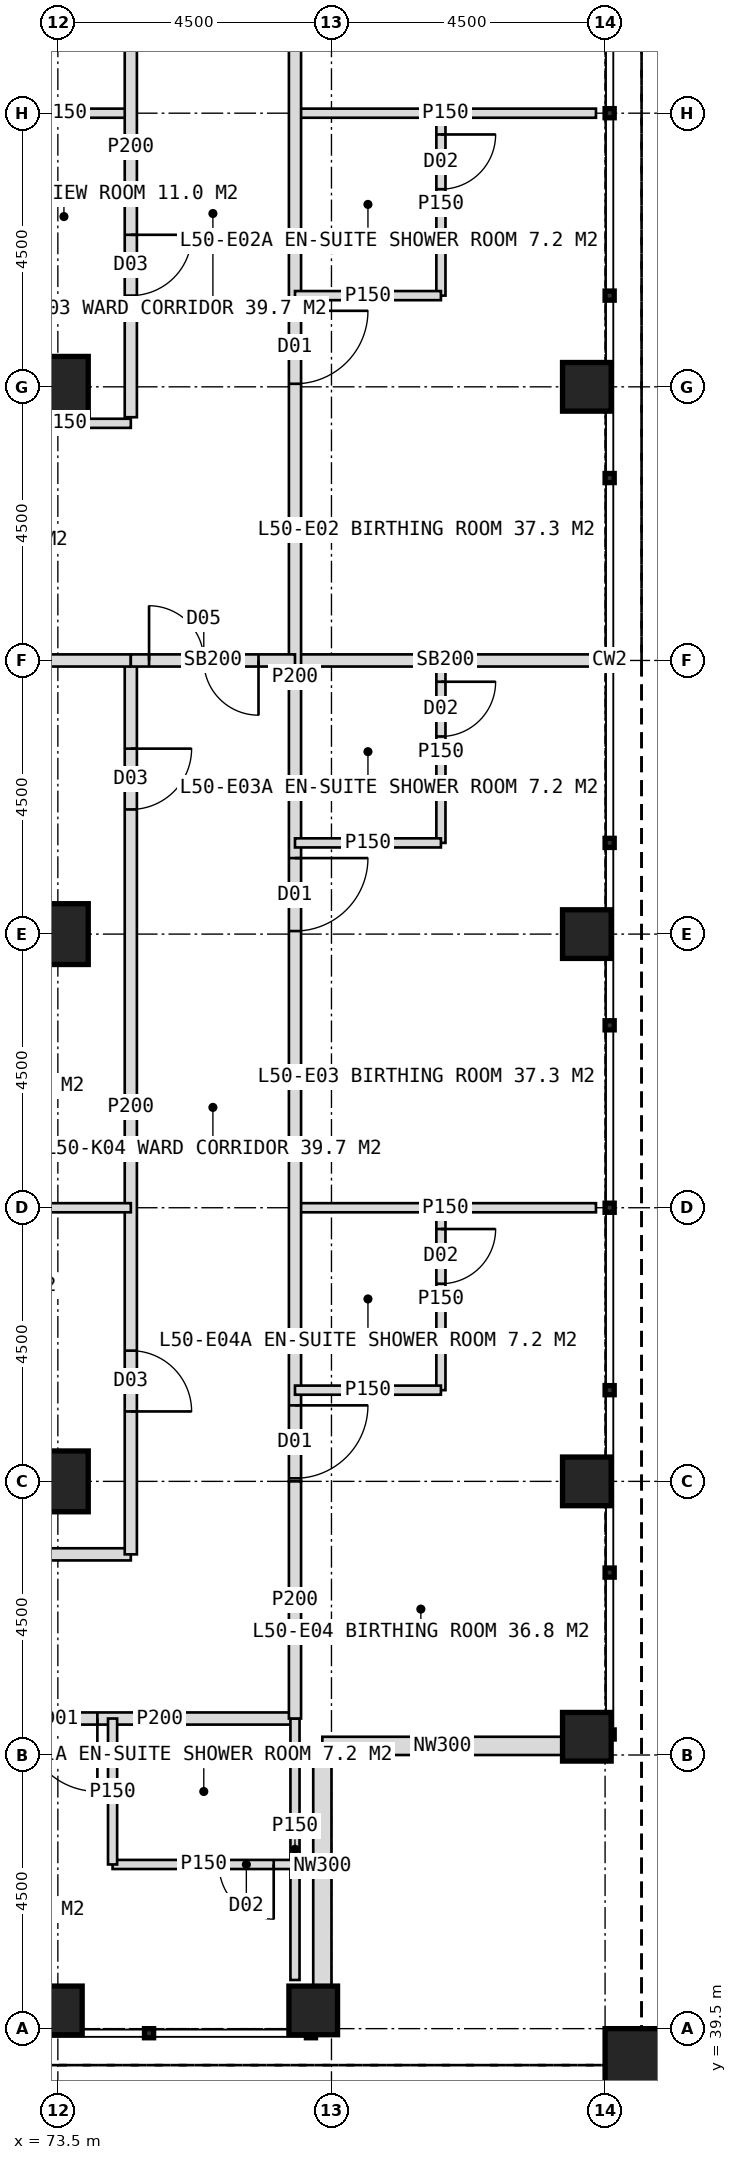
"""IFC4 building model, lengths in metres.
Left out: names, types, materials, properties, quantities, classifications, styles, units other than length and angle.
Written with IfcOpenShell. Run it as: python <this file> out.ifc"""

import sys

from ifc_helpers import new_model, si_unit, direction, frame, frame_2d, origin, origin_2d, place, context, subcontext, project, spatial, rectangle, hollow_rectangle, extrude, element, fill, save


model = new_model("IFC4")
c1 = context("Model", 3, precision=1e-05, world=origin(), true_north=direction((0.0, 1.0)))
c2 = subcontext(c1, "Body", "Model", "MODEL_VIEW")
j1 = project(units=[si_unit("LENGTHUNIT", "METRE"), si_unit("PLANEANGLEUNIT", "RADIAN")], contexts=[c1])
p1 = place(None, origin())
s1 = spatial("IfcSite", under=j1, at=p1, CompositionType="ELEMENT")
p2 = place(p1, origin())
s2 = spatial("IfcBuilding", under=s1, at=p2, CompositionType="ELEMENT")
p3 = place(p2, frame((0.0, 0.0, 209.0)))
s3 = spatial("IfcBuildingStorey", under=s2, at=p3, CompositionType="ELEMENT", Elevation=209.0)
for number, where, z_axis, x_axis in (
    (1, (73.5, 48.5, 0.0), (0.0, 0.0, 1.0), (1.0, 0.0, 0.0)),
    (2, (73.5, 57.5, 0.0), (0.0, 0.0, 1.0), (1.0, 0.0, 0.0)),
    (3, (73.5, 66.5, 0.0), (0.0, 0.0, 1.0), (1.0, 0.0, 0.0)),
):
    element("IfcColumn", number, at=place(p3, frame(where, z_axis=z_axis, x_axis=x_axis)), inside=s3, PredefinedType="COLUMN", context=c2, shape_type="SweptSolid", body=[
        extrude(hollow_rectangle(XDim=1.0, YDim=1.0, WallThickness=0.1, at=origin_2d()), origin(), (0.0, 0.0, 1.0), 4.0),
    ])
for number, where, z_axis, x_axis in (
    (4, (82.2, 44.3, 0.0), (0.0, 0.0, 1.0), (1.0, 0.0, 0.0)),
    (5, (82.2, 48.5, 0.0), (0.0, 0.0, 1.0), (1.0, 0.0, 0.0)),
    (6, (82.2, 57.5, 0.0), (0.0, 0.0, 1.0), (1.0, 0.0, 0.0)),
    (7, (82.2, 66.5, 0.0), (0.0, 0.0, 1.0), (1.0, 0.0, 0.0)),
    (8, (73.5, 39.8, 0.0), (0.0, 0.0, 1.0), (1.0, 0.0, 0.0)),
    (9, (77.7, 39.8, 0.0), (0.0, 0.0, 1.0), (1.0, 0.0, 0.0)),
):
    element("IfcColumn", number, at=place(p3, frame(where, z_axis=z_axis, x_axis=x_axis)), inside=s3, PredefinedType="COLUMN", context=c2, shape_type="SweptSolid", body=[
        extrude(hollow_rectangle(XDim=0.8, YDim=0.8, WallThickness=0.08, at=origin_2d()), origin(), (0.0, 0.0, 1.0), 4.0),
    ])
p4 = place(p3, frame((83.1, 38.9, 0.0), z_axis=(0.0, 0.0, 1.0), x_axis=(1.0, 0.0, 0.0)))
e10 = element("IfcColumn", 10, at=p4, inside=s3, PredefinedType="COLUMN", context=c2, shape_type="SweptSolid", body=[
    extrude(hollow_rectangle(XDim=1.2, YDim=1.2, WallThickness=0.07, at=origin_2d()), origin(), (0.0, 0.0, 1.0), 4.0),
])
for number, where, z_axis, x_axis in (
    (11, (81.8, 44.15, 0.0), (0.0, 0.0, 1.0), (-1.0, 0.0, 0.0)),
    (12, (77.85, 44.15, 0.0), (0.0, 0.0, 1.0), (0.0, -1.0, 0.0)),
):
    element("IfcWall", number, at=place(p3, frame(where, z_axis=z_axis, x_axis=x_axis)), inside=s3, PredefinedType="ELEMENTEDWALL", context=c2, shape_type="SweptSolid", body=[
        extrude(rectangle(XDim=3.95, YDim=0.3, at=frame_2d((1.975, 0.0))), origin(), (0.0, 0.0, 1.0), 2.85),
    ])
p5 = place(p3, frame((77.4, 44.6, 0.0), z_axis=(0.0, 0.0, 1.0), x_axis=(-1.0, 0.0, 0.0)))
e13 = element("IfcWall", 13, at=p5, inside=s3, PredefinedType="PARTITIONING", context=c2, shape_type="SweptSolid", body=[
    extrude(rectangle(XDim=4.45, YDim=0.2, at=frame_2d((2.225, 0.0))), origin(), (0.0, 0.0, 1.0), 2.85),
])
p6 = place(p5, frame((3.25, 0.0, 0.0)))
e14 = element("IfcOpeningElement", 14, at=p6, cuts=e13, PredefinedType="OPENING", context=c2, shape_type="SweptSolid", body=[
    extrude(rectangle(XDim=1.2, YDim=2.2, at=frame_2d((0.6, 1.1))), frame((0.0, 0.11, 0.0), z_axis=(0.0, -1.0, 0.0), x_axis=(1.0, 0.0, 0.0)), (0.0, 0.0, 1.0), 0.22),
])
p7 = place(p3, frame((77.4, 44.6, 0.0), z_axis=(0.0, 0.0, 1.0), x_axis=(0.0, -1.0, 0.0)))
e15 = element("IfcWall", 15, at=p7, inside=s3, PredefinedType="PARTITIONING", context=c2, shape_type="SweptSolid", body=[
    extrude(rectangle(XDim=4.3, YDim=0.15, at=frame_2d((2.15, 0.0))), origin(), (0.0, 0.0, 1.0), 2.85),
])
p8 = place(p3, frame((77.4, 42.2, 0.0), z_axis=(0.0, 0.0, 1.0), x_axis=(-1.0, 0.0, 0.0)))
e16 = element("IfcWall", 16, at=p8, inside=s3, PredefinedType="PARTITIONING", context=c2, shape_type="SweptSolid", body=[
    extrude(rectangle(XDim=3.0, YDim=0.15, at=frame_2d((1.5, 0.0))), origin(), (0.0, 0.0, 1.0), 3.75),
])
p9 = place(p8, frame((0.35, 0.0, 0.0)))
e17 = element("IfcOpeningElement", 17, at=p9, cuts=e16, PredefinedType="OPENING", context=c2, shape_type="SweptSolid", body=[
    extrude(rectangle(XDim=0.9, YDim=2.1, at=frame_2d((0.45, 1.05))), frame((0.0, 0.085, 0.0), z_axis=(0.0, -1.0, 0.0), x_axis=(1.0, 0.0, 0.0)), (0.0, 0.0, 1.0), 0.17),
])
p10 = place(p3, frame((74.4, 44.6, 0.0), z_axis=(0.0, 0.0, 1.0), x_axis=(0.0, -1.0, 0.0)))
e18 = element("IfcWall", 18, at=p10, inside=s3, PredefinedType="PARTITIONING", context=c2, shape_type="SweptSolid", body=[
    extrude(rectangle(XDim=2.4, YDim=0.15, at=frame_2d((1.2, 0.0))), origin(), (0.0, 0.0, 1.0), 3.75),
])
p11 = place(p3, frame((74.7, 47.3, 0.0), z_axis=(0.0, 0.0, 1.0), x_axis=(-1.0, 0.0, 0.0)))
e19 = element("IfcWall", 19, at=p11, inside=s3, PredefinedType="PARTITIONING", context=c2, shape_type="SweptSolid", body=[
    extrude(rectangle(XDim=5.7, YDim=0.2, at=frame_2d((2.85, 0.0))), origin(), (0.0, 0.0, 1.0), 3.75),
])
p12 = place(p3, frame((77.4, 71.0, 0.0), z_axis=(0.0, 0.0, 1.0), x_axis=(1.0, 0.0, 0.0)))
e20 = element("IfcWall", 20, at=p12, inside=s3, PredefinedType="PARTITIONING", context=c2, shape_type="SweptSolid", body=[
    extrude(rectangle(XDim=4.95, YDim=0.15, at=frame_2d((2.475, 0.0))), origin(), (0.0, 0.0, 1.0), 3.75),
])
p13 = place(p3, frame((77.4, 62.0, 0.0), z_axis=(0.0, 0.0, 1.0), x_axis=(1.0, 0.0, 0.0)))
e21 = element("IfcWall", 21, at=p13, inside=s3, PredefinedType="SOLIDWALL", context=c2, shape_type="SweptSolid", body=[
    extrude(rectangle(XDim=4.95, YDim=0.2, at=frame_2d((2.475, 0.0))), origin(), (0.0, 0.0, 1.0), 2.95),
])
p14 = place(p3, frame((77.4, 53.0, 0.0), z_axis=(0.0, 0.0, 1.0), x_axis=(1.0, 0.0, 0.0)))
e22 = element("IfcWall", 22, at=p14, inside=s3, PredefinedType="PARTITIONING", context=c2, shape_type="SweptSolid", body=[
    extrude(rectangle(XDim=4.95, YDim=0.15, at=frame_2d((2.475, 0.0))), origin(), (0.0, 0.0, 1.0), 3.75),
])
p15 = place(p3, frame((77.4, 74.95, 0.0), z_axis=(0.0, 0.0, 1.0), x_axis=(0.0, -1.0, 0.0)))
e23 = element("IfcWall", 23, at=p15, inside=s3, PredefinedType="PARTITIONING", context=c2, shape_type="SweptSolid", body=[
    extrude(rectangle(XDim=26.45, YDim=0.2, at=frame_2d((13.225, 0.0))), origin(), (0.0, 0.0, 1.0), 3.75),
])
p16 = place(p15, frame((7.2, 0.0, 0.0)))
e24 = element("IfcOpeningElement", 24, at=p16, cuts=e23, PredefinedType="OPENING", context=c2, shape_type="SweptSolid", body=[
    extrude(rectangle(XDim=1.2, YDim=2.2, at=frame_2d((0.6, 1.1))), frame((0.0, 0.11, 0.0), z_axis=(0.0, -1.0, 0.0), x_axis=(1.0, 0.0, 0.0)), (0.0, 0.0, 1.0), 0.22),
])
p17 = place(p15, frame((16.2, 0.0, 0.0)))
e25 = element("IfcOpeningElement", 25, at=p17, cuts=e23, PredefinedType="OPENING", context=c2, shape_type="SweptSolid", body=[
    extrude(rectangle(XDim=1.2, YDim=2.2, at=frame_2d((0.6, 1.1))), frame((0.0, 0.11, 0.0), z_axis=(0.0, -1.0, 0.0), x_axis=(1.0, 0.0, 0.0)), (0.0, 0.0, 1.0), 0.22),
])
p18 = place(p15, frame((25.2, 0.0, 0.0)))
e26 = element("IfcOpeningElement", 26, at=p18, cuts=e23, PredefinedType="OPENING", context=c2, shape_type="SweptSolid", body=[
    extrude(rectangle(XDim=1.2, YDim=2.2, at=frame_2d((0.6, 1.1))), frame((0.0, 0.11, 0.0), z_axis=(0.0, -1.0, 0.0), x_axis=(1.0, 0.0, 0.0)), (0.0, 0.0, 1.0), 0.22),
])
p19 = place(p3, frame((77.4, 48.5, 0.0), z_axis=(0.0, 0.0, 1.0), x_axis=(0.0, -1.0, 0.0)))
e27 = element("IfcWall", 27, at=p19, inside=s3, PredefinedType="PARTITIONING", context=c2, shape_type="SweptSolid", body=[
    extrude(rectangle(XDim=3.9, YDim=0.2, at=frame_2d((1.95, 0.0))), origin(), (0.0, 0.0, 1.0), 2.85),
])
p20 = place(p3, frame((79.8, 71.0, 0.0), z_axis=(0.0, 0.0, 1.0), x_axis=(0.0, -1.0, 0.0)))
e28 = element("IfcWall", 28, at=p20, inside=s3, PredefinedType="PARTITIONING", context=c2, shape_type="SweptSolid", body=[
    extrude(rectangle(XDim=3.0, YDim=0.15, at=frame_2d((1.5, 0.0))), origin(), (0.0, 0.0, 1.0), 3.75),
])
p21 = place(p20, frame((0.35, 0.0, 0.0)))
e29 = element("IfcOpeningElement", 29, at=p21, cuts=e28, PredefinedType="OPENING", context=c2, shape_type="SweptSolid", body=[
    extrude(rectangle(XDim=0.9, YDim=2.1, at=frame_2d((0.45, 1.05))), frame((0.0, 0.085, 0.0), z_axis=(0.0, -1.0, 0.0), x_axis=(1.0, 0.0, 0.0)), (0.0, 0.0, 1.0), 0.17),
])
p22 = place(p3, frame((77.4, 68.0, 0.0), z_axis=(0.0, 0.0, 1.0), x_axis=(1.0, 0.0, 0.0)))
e30 = element("IfcWall", 30, at=p22, inside=s3, PredefinedType="PARTITIONING", context=c2, shape_type="SweptSolid", body=[
    extrude(rectangle(XDim=2.4, YDim=0.15, at=frame_2d((1.2, 0.0))), origin(), (0.0, 0.0, 1.0), 3.75),
])
p23 = place(p3, frame((79.8, 62.0, 0.0), z_axis=(0.0, 0.0, 1.0), x_axis=(0.0, -1.0, 0.0)))
e31 = element("IfcWall", 31, at=p23, inside=s3, PredefinedType="PARTITIONING", context=c2, shape_type="SweptSolid", body=[
    extrude(rectangle(XDim=3.0, YDim=0.15, at=frame_2d((1.5, 0.0))), origin(), (0.0, 0.0, 1.0), 3.75),
])
p24 = place(p23, frame((0.35, 0.0, 0.0)))
e32 = element("IfcOpeningElement", 32, at=p24, cuts=e31, PredefinedType="OPENING", context=c2, shape_type="SweptSolid", body=[
    extrude(rectangle(XDim=0.9, YDim=2.1, at=frame_2d((0.45, 1.05))), frame((0.0, 0.085, 0.0), z_axis=(0.0, -1.0, 0.0), x_axis=(1.0, 0.0, 0.0)), (0.0, 0.0, 1.0), 0.17),
])
p25 = place(p3, frame((77.4, 59.0, 0.0), z_axis=(0.0, 0.0, 1.0), x_axis=(1.0, 0.0, 0.0)))
e33 = element("IfcWall", 33, at=p25, inside=s3, PredefinedType="PARTITIONING", context=c2, shape_type="SweptSolid", body=[
    extrude(rectangle(XDim=2.4, YDim=0.15, at=frame_2d((1.2, 0.0))), origin(), (0.0, 0.0, 1.0), 3.75),
])
p26 = place(p3, frame((79.8, 53.0, 0.0), z_axis=(0.0, 0.0, 1.0), x_axis=(0.0, -1.0, 0.0)))
e34 = element("IfcWall", 34, at=p26, inside=s3, PredefinedType="PARTITIONING", context=c2, shape_type="SweptSolid", body=[
    extrude(rectangle(XDim=3.0, YDim=0.15, at=frame_2d((1.5, 0.0))), origin(), (0.0, 0.0, 1.0), 3.75),
])
p27 = place(p26, frame((0.35, 0.0, 0.0)))
e35 = element("IfcOpeningElement", 35, at=p27, cuts=e34, PredefinedType="OPENING", context=c2, shape_type="SweptSolid", body=[
    extrude(rectangle(XDim=0.9, YDim=2.1, at=frame_2d((0.45, 1.05))), frame((0.0, 0.085, 0.0), z_axis=(0.0, -1.0, 0.0), x_axis=(1.0, 0.0, 0.0)), (0.0, 0.0, 1.0), 0.17),
])
p28 = place(p3, frame((77.4, 50.0, 0.0), z_axis=(0.0, 0.0, 1.0), x_axis=(1.0, 0.0, 0.0)))
e36 = element("IfcWall", 36, at=p28, inside=s3, PredefinedType="PARTITIONING", context=c2, shape_type="SweptSolid", body=[
    extrude(rectangle(XDim=2.4, YDim=0.15, at=frame_2d((1.2, 0.0))), origin(), (0.0, 0.0, 1.0), 3.75),
])
p29 = place(p3, frame((72.5, 71.0, 0.0), z_axis=(0.0, 0.0, 1.0), x_axis=(1.0, 0.0, 0.0)))
e37 = element("IfcWall", 37, at=p29, inside=s3, PredefinedType="PARTITIONING", context=c2, shape_type="SweptSolid", body=[
    extrude(rectangle(XDim=2.2, YDim=0.15, at=frame_2d((1.1, 0.0))), origin(), (0.0, 0.0, 1.0), 3.75),
])
p30 = place(p3, frame((74.7, 74.9, 0.0), z_axis=(0.0, 0.0, 1.0), x_axis=(0.0, -1.0, 0.0)))
e38 = element("IfcWall", 38, at=p30, inside=s3, PredefinedType="PARTITIONING", context=c2, shape_type="SweptSolid", body=[
    extrude(rectangle(XDim=8.9, YDim=0.2, at=frame_2d((4.45, 0.0))), origin(), (0.0, 0.0, 1.0), 3.75),
])
p31 = place(p30, frame((0.25, 0.0, 0.0)))
e39 = element("IfcOpeningElement", 39, at=p31, cuts=e38, PredefinedType="OPENING", context=c2, shape_type="SweptSolid", body=[
    extrude(rectangle(XDim=1.0, YDim=2.1, at=frame_2d((0.5, 1.05))), frame((0.0, 0.11, 0.0), z_axis=(0.0, -1.0, 0.0), x_axis=(1.0, 0.0, 0.0)), (0.0, 0.0, 1.0), 0.22),
])
p32 = place(p30, frame((5.9, 0.0, 0.0)))
e40 = element("IfcOpeningElement", 40, at=p32, cuts=e38, PredefinedType="OPENING", context=c2, shape_type="SweptSolid", body=[
    extrude(rectangle(XDim=1.0, YDim=2.1, at=frame_2d((0.5, 1.05))), frame((0.0, 0.11, 0.0), z_axis=(0.0, -1.0, 0.0), x_axis=(1.0, 0.0, 0.0)), (0.0, 0.0, 1.0), 0.22),
])
p33 = place(p3, frame((74.7, 62.0, 0.0), z_axis=(0.0, 0.0, 1.0), x_axis=(0.0, -1.0, 0.0)))
e41 = element("IfcWall", 41, at=p33, inside=s3, PredefinedType="PARTITIONING", context=c2, shape_type="SweptSolid", body=[
    extrude(rectangle(XDim=14.7, YDim=0.2, at=frame_2d((7.35, 0.0))), origin(), (0.0, 0.0, 1.0), 3.75),
])
p34 = place(p33, frame((1.45, 0.0, 0.0)))
e42 = element("IfcOpeningElement", 42, at=p34, cuts=e41, PredefinedType="OPENING", context=c2, shape_type="SweptSolid", body=[
    extrude(rectangle(XDim=1.0, YDim=2.1, at=frame_2d((0.5, 1.05))), frame((0.0, 0.11, 0.0), z_axis=(0.0, -1.0, 0.0), x_axis=(1.0, 0.0, 0.0)), (0.0, 0.0, 1.0), 0.22),
])
p35 = place(p33, frame((11.35, 0.0, 0.0)))
e43 = element("IfcOpeningElement", 43, at=p35, cuts=e41, PredefinedType="OPENING", context=c2, shape_type="SweptSolid", body=[
    extrude(rectangle(XDim=1.0, YDim=2.1, at=frame_2d((0.5, 1.05))), frame((0.0, 0.11, 0.0), z_axis=(0.0, -1.0, 0.0), x_axis=(1.0, 0.0, 0.0)), (0.0, 0.0, 1.0), 0.22),
])
p36 = place(p3, frame((72.5, 65.9, 0.0), z_axis=(0.0, 0.0, 1.0), x_axis=(1.0, 0.0, 0.0)))
e44 = element("IfcWall", 44, at=p36, inside=s3, PredefinedType="PARTITIONING", context=c2, shape_type="SweptSolid", body=[
    extrude(rectangle(XDim=2.2, YDim=0.15, at=frame_2d((1.1, 0.0))), origin(), (0.0, 0.0, 1.0), 3.75),
])
p37 = place(p3, frame((69.0, 62.0, 0.0), z_axis=(0.0, 0.0, 1.0), x_axis=(1.0, 0.0, 0.0)))
e45 = element("IfcWall", 45, at=p37, inside=s3, PredefinedType="SOLIDWALL", context=c2, shape_type="SweptSolid", body=[
    extrude(rectangle(XDim=5.7, YDim=0.2, at=frame_2d((2.85, 0.0))), origin(), (0.0, 0.0, 1.0), 2.95),
])
p38 = place(p3, frame((69.0, 53.0, 0.0), z_axis=(0.0, 0.0, 1.0), x_axis=(1.0, 0.0, 0.0)))
e46 = element("IfcWall", 46, at=p38, inside=s3, PredefinedType="PARTITIONING", context=c2, shape_type="SweptSolid", body=[
    extrude(rectangle(XDim=5.7, YDim=0.15, at=frame_2d((2.85, 0.0))), origin(), (0.0, 0.0, 1.0), 3.75),
])
p39 = place(p3, frame((74.7, 62.0, 0.0), z_axis=(0.0, 0.0, 1.0), x_axis=(1.0, 0.0, 0.0)))
e47 = element("IfcWall", 47, at=p39, inside=s3, PredefinedType="SOLIDWALL", context=c2, shape_type="SweptSolid", body=[
    extrude(rectangle(XDim=2.7, YDim=0.2, at=frame_2d((1.35, 0.0))), origin(), (0.0, 0.0, 1.0), 2.95),
])
p40 = place(p39, frame((0.3, 0.0, 0.0)))
e48 = element("IfcOpeningElement", 48, at=p40, cuts=e47, PredefinedType="OPENING", context=c2, shape_type="SweptSolid", body=[
    extrude(rectangle(XDim=1.8, YDim=2.2, at=frame_2d((0.9, 1.1))), frame((0.0, 0.11, 0.0), z_axis=(0.0, -1.0, 0.0), x_axis=(1.0, 0.0, 0.0)), (0.0, 0.0, 1.0), 0.22),
])
p41 = place(p6, origin())
e49 = element("IfcDoor", 49, at=p41, inside=s3, OperationType="SINGLE_SWING_LEFT", PredefinedType="DOOR", context=c2, shape_type="SweptSolid", body=[
    extrude(rectangle(XDim=1.2, YDim=2.2, at=frame_2d((0.6, 1.1))), frame((0.0, 0.025, 0.0), z_axis=(0.0, -1.0, 0.0), x_axis=(1.0, 0.0, 0.0)), (0.0, 0.0, 1.0), 0.05),
])
fill(e14, e49)
p42 = place(p9, origin())
e50 = element("IfcDoor", 50, at=p42, inside=s3, OperationType="SINGLE_SWING_LEFT", PredefinedType="DOOR", context=c2, shape_type="SweptSolid", body=[
    extrude(rectangle(XDim=0.9, YDim=2.1, at=frame_2d((0.45, 1.05))), frame((0.0, 0.025, 0.0), z_axis=(0.0, -1.0, 0.0), x_axis=(1.0, 0.0, 0.0)), (0.0, 0.0, 1.0), 0.05),
])
fill(e17, e50)
p43 = place(p16, origin())
e51 = element("IfcDoor", 51, at=p43, inside=s3, OperationType="SINGLE_SWING_LEFT", PredefinedType="DOOR", context=c2, shape_type="SweptSolid", body=[
    extrude(rectangle(XDim=1.2, YDim=2.2, at=frame_2d((0.6, 1.1))), frame((0.0, 0.025, 0.0), z_axis=(0.0, -1.0, 0.0), x_axis=(1.0, 0.0, 0.0)), (0.0, 0.0, 1.0), 0.05),
])
fill(e24, e51)
p44 = place(p21, origin())
e52 = element("IfcDoor", 52, at=p44, inside=s3, OperationType="SINGLE_SWING_LEFT", PredefinedType="DOOR", context=c2, shape_type="SweptSolid", body=[
    extrude(rectangle(XDim=0.9, YDim=2.1, at=frame_2d((0.45, 1.05))), frame((0.0, 0.025, 0.0), z_axis=(0.0, -1.0, 0.0), x_axis=(1.0, 0.0, 0.0)), (0.0, 0.0, 1.0), 0.05),
])
fill(e29, e52)
p45 = place(p17, origin())
e53 = element("IfcDoor", 53, at=p45, inside=s3, OperationType="SINGLE_SWING_LEFT", PredefinedType="DOOR", context=c2, shape_type="SweptSolid", body=[
    extrude(rectangle(XDim=1.2, YDim=2.2, at=frame_2d((0.6, 1.1))), frame((0.0, 0.025, 0.0), z_axis=(0.0, -1.0, 0.0), x_axis=(1.0, 0.0, 0.0)), (0.0, 0.0, 1.0), 0.05),
])
fill(e25, e53)
p46 = place(p24, origin())
e54 = element("IfcDoor", 54, at=p46, inside=s3, OperationType="SINGLE_SWING_LEFT", PredefinedType="DOOR", context=c2, shape_type="SweptSolid", body=[
    extrude(rectangle(XDim=0.9, YDim=2.1, at=frame_2d((0.45, 1.05))), frame((0.0, 0.025, 0.0), z_axis=(0.0, -1.0, 0.0), x_axis=(1.0, 0.0, 0.0)), (0.0, 0.0, 1.0), 0.05),
])
fill(e32, e54)
p47 = place(p18, origin())
e55 = element("IfcDoor", 55, at=p47, inside=s3, OperationType="SINGLE_SWING_LEFT", PredefinedType="DOOR", context=c2, shape_type="SweptSolid", body=[
    extrude(rectangle(XDim=1.2, YDim=2.2, at=frame_2d((0.6, 1.1))), frame((0.0, 0.025, 0.0), z_axis=(0.0, -1.0, 0.0), x_axis=(1.0, 0.0, 0.0)), (0.0, 0.0, 1.0), 0.05),
])
fill(e26, e55)
p48 = place(p27, origin())
e56 = element("IfcDoor", 56, at=p48, inside=s3, OperationType="SINGLE_SWING_LEFT", PredefinedType="DOOR", context=c2, shape_type="SweptSolid", body=[
    extrude(rectangle(XDim=0.9, YDim=2.1, at=frame_2d((0.45, 1.05))), frame((0.0, 0.025, 0.0), z_axis=(0.0, -1.0, 0.0), x_axis=(1.0, 0.0, 0.0)), (0.0, 0.0, 1.0), 0.05),
])
fill(e35, e56)
p49 = place(p32, origin())
e57 = element("IfcDoor", 57, at=p49, inside=s3, OperationType="SINGLE_SWING_LEFT", PredefinedType="DOOR", context=c2, shape_type="SweptSolid", body=[
    extrude(rectangle(XDim=1.0, YDim=2.1, at=frame_2d((0.5, 1.05))), frame((0.0, 0.025, 0.0), z_axis=(0.0, -1.0, 0.0), x_axis=(1.0, 0.0, 0.0)), (0.0, 0.0, 1.0), 0.05),
])
fill(e40, e57)
p50 = place(p34, origin())
e58 = element("IfcDoor", 58, at=p50, inside=s3, OperationType="SINGLE_SWING_LEFT", PredefinedType="DOOR", context=c2, shape_type="SweptSolid", body=[
    extrude(rectangle(XDim=1.0, YDim=2.1, at=frame_2d((0.5, 1.05))), frame((0.0, 0.025, 0.0), z_axis=(0.0, -1.0, 0.0), x_axis=(1.0, 0.0, 0.0)), (0.0, 0.0, 1.0), 0.05),
])
fill(e42, e58)
p51 = place(p35, origin())
e59 = element("IfcDoor", 59, at=p51, inside=s3, OperationType="SINGLE_SWING_RIGHT", PredefinedType="DOOR", context=c2, shape_type="SweptSolid", body=[
    extrude(rectangle(XDim=1.0, YDim=2.1, at=frame_2d((0.5, 1.05))), frame((0.0, 0.025, 0.0), z_axis=(0.0, -1.0, 0.0), x_axis=(1.0, 0.0, 0.0)), (0.0, 0.0, 1.0), 0.05),
])
fill(e43, e59)
p52 = place(p40, origin())
e60 = element("IfcDoor", 60, at=p52, inside=s3, OperationType="DOUBLE_DOOR_DOUBLE_SWING", PredefinedType="DOOR", context=c2, shape_type="SweptSolid", body=[
    extrude(rectangle(XDim=1.8, YDim=2.2, at=frame_2d((0.9, 1.1))), frame((0.0, 0.025, 0.0), z_axis=(0.0, -1.0, 0.0), x_axis=(1.0, 0.0, 0.0)), (0.0, 0.0, 1.0), 0.05),
])
fill(e48, e60)
save(model, sys.argv[1])
